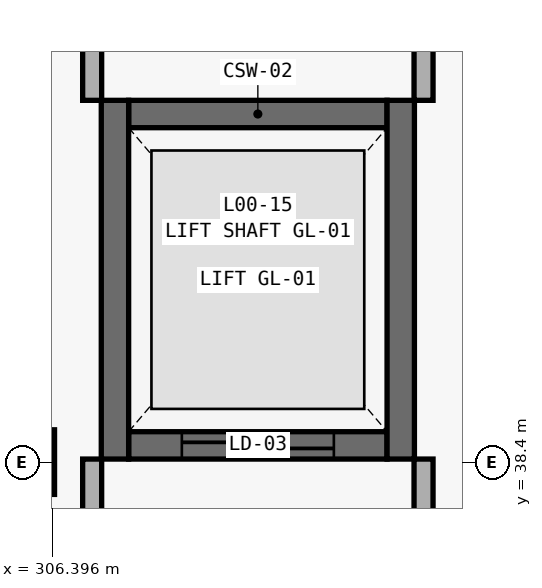
"""IFC4 building model, lengths in metres.
Left out: names, types, materials, properties, quantities, classifications, styles, units other than length and angle.
Written with IfcOpenShell. Run it as: python <this file> out.ifc"""

import sys

from ifc_helpers import new_model, si_unit, direction, frame, frame_2d, origin, origin_2d, place, context, subcontext, project, spatial, rectangle, extrude, element, fill, save


model = new_model("IFC4")
c1 = context("Model", 3, precision=1e-05, world=origin(), true_north=direction((0.0, 1.0)))
c2 = subcontext(c1, "Body", "Model", "MODEL_VIEW")
j1 = project(units=[si_unit("LENGTHUNIT", "METRE"), si_unit("PLANEANGLEUNIT", "RADIAN")], contexts=[c1])
p1 = place(None, origin())
s1 = spatial("IfcSite", under=j1, at=p1, CompositionType="ELEMENT")
p2 = place(p1, origin())
s2 = spatial("IfcBuilding", under=s1, at=p2, CompositionType="ELEMENT")
p3 = place(p2, origin())
s3 = spatial("IfcBuildingStorey", under=s2, at=p3, CompositionType="ELEMENT", Elevation=0.0)
p4 = place(p3, frame((306.0, 38.4, 0.0), z_axis=(0.0, 0.0, 1.0), x_axis=(1.0, 0.0, 0.0)))
e1 = element("IfcColumn", 1, at=p4, inside=s3, PredefinedType="COLUMN", context=c2, shape_type="SweptSolid", body=[
    extrude(rectangle(XDim=0.85, YDim=0.85, at=origin_2d()), origin(), (0.0, 0.0, 1.0), 4.8),
])
p5 = place(p3, frame((307.4, 42.98, 0.0), z_axis=(0.0, 0.0, 1.0), x_axis=(1.0, 0.0, 0.0)))
e2 = element("IfcWall", 2, at=p5, inside=s3, PredefinedType="SHEAR", context=c2, shape_type="SweptSolid", body=[
    extrude(rectangle(XDim=3.4, YDim=0.36, at=frame_2d((1.7, 0.0))), origin(), (0.0, 0.0, 1.0), 4.5),
])
p6 = place(p3, frame((307.4, 38.62, 0.0), z_axis=(0.0, 0.0, 1.0), x_axis=(1.0, 0.0, 0.0)))
e3 = element("IfcWall", 3, at=p6, inside=s3, PredefinedType="SHEAR", context=c2, shape_type="SweptSolid", body=[
    extrude(rectangle(XDim=3.4, YDim=0.36, at=frame_2d((1.7, 0.0))), origin(), (0.0, 0.0, 1.0), 4.5),
])
p7 = place(p6, frame((0.7, 0.0, 0.0)))
e4 = element("IfcOpeningElement", 4, at=p7, cuts=e3, PredefinedType="OPENING", context=c2, shape_type="SweptSolid", body=[
    extrude(rectangle(XDim=2.0, YDim=2.4, at=frame_2d((1.0, 1.2))), frame((0.0, 0.195, 0.0), z_axis=(0.0, -1.0, 0.0), x_axis=(1.0, 0.0, 0.0)), (0.0, 0.0, 1.0), 0.39),
])
for number, where, z_axis, x_axis in (
    (5, (307.22, 38.44, 0.0), (0.0, 0.0, 1.0), (0.0, 1.0, 0.0)),
    (6, (310.98, 38.44, 0.0), (0.0, 0.0, 1.0), (0.0, 1.0, 0.0)),
):
    element("IfcWall", number, at=place(p3, frame(where, z_axis=z_axis, x_axis=x_axis)), inside=s3, PredefinedType="SHEAR", context=c2, shape_type="SweptSolid", body=[
        extrude(rectangle(XDim=4.72, YDim=0.36, at=frame_2d((2.36, 0.0))), origin(), (0.0, 0.0, 1.0), 4.5),
    ])
p8 = place(p3, frame((306.92, 36.645, 0.0), z_axis=(0.0, 0.0, 1.0), x_axis=(0.0, 1.0, 0.0)))
e7 = element("IfcWall", 7, at=p8, inside=s3, PredefinedType="PARTITIONING", context=c2, shape_type="SweptSolid", body=[
    extrude(rectangle(XDim=1.795, YDim=0.25, at=frame_2d((0.897, 0.0))), origin(), (0.0, 0.0, 1.0), 3.38),
])
p9 = place(p3, frame((306.92, 43.16, 0.0), z_axis=(0.0, 0.0, 1.0), x_axis=(0.0, 1.0, 0.0)))
e8 = element("IfcWall", 8, at=p9, inside=s3, PredefinedType="PARTITIONING", context=c2, shape_type="SweptSolid", body=[
    extrude(rectangle(XDim=0.795, YDim=0.25, at=frame_2d((0.397, 0.0))), origin(), (0.0, 0.0, 1.0), 3.38),
])
p10 = place(p3, frame((311.28, 36.645, 0.0), z_axis=(0.0, 0.0, 1.0), x_axis=(0.0, 1.0, 0.0)))
e9 = element("IfcWall", 9, at=p10, inside=s3, PredefinedType="PARTITIONING", context=c2, shape_type="SweptSolid", body=[
    extrude(rectangle(XDim=1.795, YDim=0.25, at=frame_2d((0.897, 0.0))), origin(), (0.0, 0.0, 1.0), 3.38),
])
p11 = place(p3, frame((311.28, 43.16, 0.0), z_axis=(0.0, 0.0, 1.0), x_axis=(0.0, 1.0, 0.0)))
e10 = element("IfcWall", 10, at=p11, inside=s3, PredefinedType="PARTITIONING", context=c2, shape_type="SweptSolid", body=[
    extrude(rectangle(XDim=0.795, YDim=0.25, at=frame_2d((0.397, 0.0))), origin(), (0.0, 0.0, 1.0), 3.38),
])
p12 = place(p7, origin())
e11 = element("IfcDoor", 11, at=p12, inside=s3, OperationType="DOUBLE_DOOR_SLIDING", PredefinedType="DOOR", context=c2, shape_type="SweptSolid", body=[
    extrude(rectangle(XDim=2.0, YDim=2.4, at=frame_2d((1.0, 1.2))), frame((0.0, 0.025, 0.0), z_axis=(0.0, -1.0, 0.0), x_axis=(1.0, 0.0, 0.0)), (0.0, 0.0, 1.0), 0.05),
])
fill(e4, e11)
save(model, sys.argv[1])
